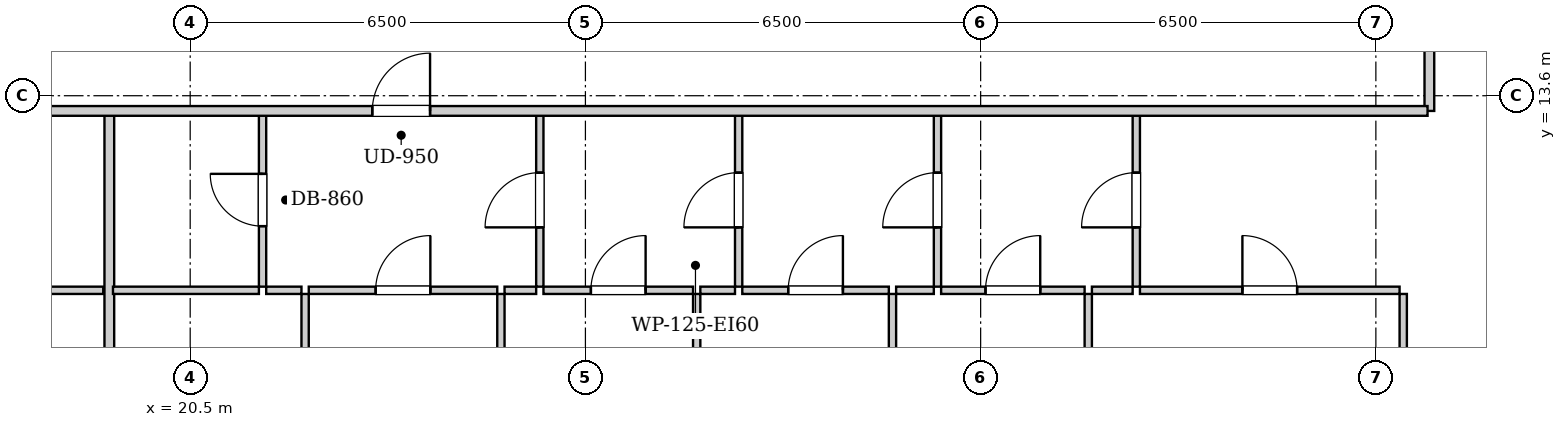
"""IFC4 building model, lengths in metres.
Left out: names, types, materials, properties, quantities, classifications, styles, units other than length and angle.
Written with IfcOpenShell. Run it as: python <this file> out.ifc"""

import sys

from ifc_helpers import new_model, si_unit, direction, frame, frame_2d, origin, place, context, subcontext, project, spatial, rectangle, extrude, element, fill, save


model = new_model("IFC4")
c1 = context("Model", 3, precision=1e-05, world=origin(), true_north=direction((0.0, 1.0)))
c2 = subcontext(c1, "Body", "Model", "MODEL_VIEW")
j1 = project(units=[si_unit("LENGTHUNIT", "METRE"), si_unit("PLANEANGLEUNIT", "RADIAN")], contexts=[c1])
p1 = place(None, origin())
s1 = spatial("IfcSite", under=j1, at=p1, CompositionType="ELEMENT")
p2 = place(p1, origin())
s2 = spatial("IfcBuilding", under=s1, at=p2, CompositionType="ELEMENT")
p3 = place(p2, frame((0.0, 0.0, 84.7)))
s3 = spatial("IfcBuildingStorey", under=s2, at=p3, CompositionType="ELEMENT", Elevation=84.7)
p4 = place(p3, frame((40.88, 13.35, 0.0), z_axis=(0.0, 0.0, 1.0), x_axis=(0.0, 1.0, 0.0)))
e1 = element("IfcWall", 1, at=p4, inside=s3, PredefinedType="PARTITIONING", context=c2, shape_type="SweptSolid", body=[
    extrude(rectangle(XDim=1.74, YDim=0.16, at=frame_2d((0.87, 0.0))), origin(), (0.0, 0.0, 1.0), 2.94),
])
p5 = place(p3, frame((16.17, 10.4, 0.0), z_axis=(0.0, 0.0, 1.0), x_axis=(1.0, 0.0, 0.0)))
e2 = element("IfcWall", 2, at=p5, inside=s3, PredefinedType="PARTITIONING", context=c2, shape_type="SweptSolid", body=[
    extrude(rectangle(XDim=2.9, YDim=0.12, at=frame_2d((1.45, 0.0))), origin(), (0.0, 0.0, 1.0), 2.94),
])
p6 = place(p5, frame((1.0, 0.0, 0.0)))
e3 = element("IfcOpeningElement", 3, at=p6, cuts=e2, PredefinedType="OPENING", context=c2, shape_type="SweptSolid", body=[
    extrude(rectangle(XDim=0.9, YDim=2.05, at=frame_2d((0.45, 1.025))), frame((0.0, 0.07, 0.0), z_axis=(0.0, -1.0, 0.0), x_axis=(1.0, 0.0, 0.0)), (0.0, 0.0, 1.0), 0.14),
])
p7 = place(p3, frame((19.17, 0.28, 0.0), z_axis=(0.0, 0.0, 1.0), x_axis=(0.0, 1.0, 0.0)))
e4 = element("IfcWall", 4, at=p7, inside=s3, PredefinedType="PARTITIONING", context=c2, shape_type="SweptSolid", body=[
    extrude(rectangle(XDim=13.03, YDim=0.16, at=frame_2d((6.515, 0.0))), origin(), (0.0, 0.0, 1.0), 2.94),
])
p8 = place(p3, frame((21.69, 10.46, 0.0), z_axis=(0.0, 0.0, 1.0), x_axis=(0.0, 1.0, 0.0)))
e5 = element("IfcWall", 5, at=p8, inside=s3, PredefinedType="PARTITIONING", context=c2, shape_type="SweptSolid", body=[
    extrude(rectangle(XDim=2.85, YDim=0.12, at=frame_2d((1.425, 0.0))), origin(), (0.0, 0.0, 1.0), 2.94),
])
p9 = place(p8, frame((0.995, 0.0, 0.0)))
e6 = element("IfcOpeningElement", 6, at=p9, cuts=e5, PredefinedType="OPENING", context=c2, shape_type="SweptSolid", body=[
    extrude(rectangle(XDim=0.86, YDim=2.05, at=frame_2d((0.43, 1.025))), frame((0.0, 0.07, 0.0), z_axis=(0.0, -1.0, 0.0), x_axis=(1.0, 0.0, 0.0)), (0.0, 0.0, 1.0), 0.14),
])
p10 = place(p3, frame((19.23, 10.4, 0.0), z_axis=(0.0, 0.0, 1.0), x_axis=(1.0, 0.0, 0.0)))
e7 = element("IfcWall", 7, at=p10, inside=s3, PredefinedType="PARTITIONING", context=c2, shape_type="SweptSolid", body=[
    extrude(rectangle(XDim=2.4, YDim=0.12, at=frame_2d((1.2, 0.0))), origin(), (0.0, 0.0, 1.0), 2.94),
])
p11 = place(p3, frame((26.25, 10.46, 0.0), z_axis=(0.0, 0.0, 1.0), x_axis=(0.0, 1.0, 0.0)))
e8 = element("IfcWall", 8, at=p11, inside=s3, PredefinedType="PARTITIONING", context=c2, shape_type="SweptSolid", body=[
    extrude(rectangle(XDim=2.85, YDim=0.12, at=frame_2d((1.425, 0.0))), origin(), (0.0, 0.0, 1.0), 2.94),
])
p12 = place(p11, frame((0.975, 0.0, 0.0)))
e9 = element("IfcOpeningElement", 9, at=p12, cuts=e8, PredefinedType="OPENING", context=c2, shape_type="SweptSolid", body=[
    extrude(rectangle(XDim=0.9, YDim=2.05, at=frame_2d((0.45, 1.025))), frame((0.0, 0.07, 0.0), z_axis=(0.0, -1.0, 0.0), x_axis=(1.0, 0.0, 0.0)), (0.0, 0.0, 1.0), 0.14),
])
p13 = place(p3, frame((21.75, 10.4, 0.0), z_axis=(0.0, 0.0, 1.0), x_axis=(1.0, 0.0, 0.0)))
e10 = element("IfcWall", 10, at=p13, inside=s3, PredefinedType="PARTITIONING", context=c2, shape_type="SweptSolid", body=[
    extrude(rectangle(XDim=0.58, YDim=0.12, at=frame_2d((0.29, 0.0))), origin(), (0.0, 0.0, 1.0), 2.94),
])
p14 = place(p3, frame((22.45, 10.4, 0.0), z_axis=(0.0, 0.0, 1.0), x_axis=(1.0, 0.0, 0.0)))
e11 = element("IfcWall", 11, at=p14, inside=s3, PredefinedType="PARTITIONING", context=c2, shape_type="SweptSolid", body=[
    extrude(rectangle(XDim=3.1, YDim=0.12, at=frame_2d((1.55, 0.0))), origin(), (0.0, 0.0, 1.0), 2.94),
])
p15 = place(p14, frame((1.1, 0.0, 0.0)))
e12 = element("IfcOpeningElement", 12, at=p15, cuts=e11, PredefinedType="OPENING", context=c2, shape_type="SweptSolid", body=[
    extrude(rectangle(XDim=0.9, YDim=2.05, at=frame_2d((0.45, 1.025))), frame((0.0, 0.07, 0.0), z_axis=(0.0, -1.0, 0.0), x_axis=(1.0, 0.0, 0.0)), (0.0, 0.0, 1.0), 0.14),
])
p16 = place(p3, frame((25.67, 10.4, 0.0), z_axis=(0.0, 0.0, 1.0), x_axis=(1.0, 0.0, 0.0)))
e13 = element("IfcWall", 13, at=p16, inside=s3, PredefinedType="PARTITIONING", context=c2, shape_type="SweptSolid", body=[
    extrude(rectangle(XDim=0.52, YDim=0.12, at=frame_2d((0.26, 0.0))), origin(), (0.0, 0.0, 1.0), 2.94),
])
p17 = place(p3, frame((29.52, 10.46, 0.0), z_axis=(0.0, 0.0, 1.0), x_axis=(0.0, 1.0, 0.0)))
e14 = element("IfcWall", 14, at=p17, inside=s3, PredefinedType="PARTITIONING", context=c2, shape_type="SweptSolid", body=[
    extrude(rectangle(XDim=2.85, YDim=0.12, at=frame_2d((1.425, 0.0))), origin(), (0.0, 0.0, 1.0), 2.94),
])
p18 = place(p17, frame((0.975, 0.0, 0.0)))
e15 = element("IfcOpeningElement", 15, at=p18, cuts=e14, PredefinedType="OPENING", context=c2, shape_type="SweptSolid", body=[
    extrude(rectangle(XDim=0.9, YDim=2.05, at=frame_2d((0.45, 1.025))), frame((0.0, 0.07, 0.0), z_axis=(0.0, -1.0, 0.0), x_axis=(1.0, 0.0, 0.0)), (0.0, 0.0, 1.0), 0.14),
])
p19 = place(p3, frame((26.31, 10.4, 0.0), z_axis=(0.0, 0.0, 1.0), x_axis=(1.0, 0.0, 0.0)))
e16 = element("IfcWall", 16, at=p19, inside=s3, PredefinedType="PARTITIONING", context=c2, shape_type="SweptSolid", body=[
    extrude(rectangle(XDim=2.46, YDim=0.12, at=frame_2d((1.23, 0.0))), origin(), (0.0, 0.0, 1.0), 2.94),
])
p20 = place(p19, frame((0.78, 0.0, 0.0)))
e17 = element("IfcOpeningElement", 17, at=p20, cuts=e16, PredefinedType="OPENING", context=c2, shape_type="SweptSolid", body=[
    extrude(rectangle(XDim=0.9, YDim=2.05, at=frame_2d((0.45, 1.025))), frame((0.0, 0.07, 0.0), z_axis=(0.0, -1.0, 0.0), x_axis=(1.0, 0.0, 0.0)), (0.0, 0.0, 1.0), 0.14),
])
p21 = place(p3, frame((28.89, 10.4, 0.0), z_axis=(0.0, 0.0, 1.0), x_axis=(1.0, 0.0, 0.0)))
e18 = element("IfcWall", 18, at=p21, inside=s3, PredefinedType="PARTITIONING", context=c2, shape_type="SweptSolid", body=[
    extrude(rectangle(XDim=0.57, YDim=0.12, at=frame_2d((0.285, 0.0))), origin(), (0.0, 0.0, 1.0), 2.94),
])
p22 = place(p3, frame((32.79, 10.46, 0.0), z_axis=(0.0, 0.0, 1.0), x_axis=(0.0, 1.0, 0.0)))
e19 = element("IfcWall", 19, at=p22, inside=s3, PredefinedType="PARTITIONING", context=c2, shape_type="SweptSolid", body=[
    extrude(rectangle(XDim=2.85, YDim=0.12, at=frame_2d((1.425, 0.0))), origin(), (0.0, 0.0, 1.0), 2.94),
])
p23 = place(p22, frame((0.975, 0.0, 0.0)))
e20 = element("IfcOpeningElement", 20, at=p23, cuts=e19, PredefinedType="OPENING", context=c2, shape_type="SweptSolid", body=[
    extrude(rectangle(XDim=0.9, YDim=2.05, at=frame_2d((0.45, 1.025))), frame((0.0, 0.07, 0.0), z_axis=(0.0, -1.0, 0.0), x_axis=(1.0, 0.0, 0.0)), (0.0, 0.0, 1.0), 0.14),
])
p24 = place(p3, frame((29.58, 10.4, 0.0), z_axis=(0.0, 0.0, 1.0), x_axis=(1.0, 0.0, 0.0)))
e21 = element("IfcWall", 21, at=p24, inside=s3, PredefinedType="PARTITIONING", context=c2, shape_type="SweptSolid", body=[
    extrude(rectangle(XDim=2.41, YDim=0.12, at=frame_2d((1.205, 0.0))), origin(), (0.0, 0.0, 1.0), 2.94),
])
p25 = place(p24, frame((0.755, 0.0, 0.0)))
e22 = element("IfcOpeningElement", 22, at=p25, cuts=e21, PredefinedType="OPENING", context=c2, shape_type="SweptSolid", body=[
    extrude(rectangle(XDim=0.9, YDim=2.05, at=frame_2d((0.45, 1.025))), frame((0.0, 0.07, 0.0), z_axis=(0.0, -1.0, 0.0), x_axis=(1.0, 0.0, 0.0)), (0.0, 0.0, 1.0), 0.14),
])
p26 = place(p3, frame((32.11, 10.4, 0.0), z_axis=(0.0, 0.0, 1.0), x_axis=(1.0, 0.0, 0.0)))
e23 = element("IfcWall", 23, at=p26, inside=s3, PredefinedType="PARTITIONING", context=c2, shape_type="SweptSolid", body=[
    extrude(rectangle(XDim=0.62, YDim=0.12, at=frame_2d((0.31, 0.0))), origin(), (0.0, 0.0, 1.0), 2.94),
])
p27 = place(p3, frame((36.06, 10.46, 0.0), z_axis=(0.0, 0.0, 1.0), x_axis=(0.0, 1.0, 0.0)))
e24 = element("IfcWall", 24, at=p27, inside=s3, PredefinedType="PARTITIONING", context=c2, shape_type="SweptSolid", body=[
    extrude(rectangle(XDim=2.85, YDim=0.12, at=frame_2d((1.425, 0.0))), origin(), (0.0, 0.0, 1.0), 2.94),
])
p28 = place(p27, frame((0.975, 0.0, 0.0)))
e25 = element("IfcOpeningElement", 25, at=p28, cuts=e24, PredefinedType="OPENING", context=c2, shape_type="SweptSolid", body=[
    extrude(rectangle(XDim=0.9, YDim=2.05, at=frame_2d((0.45, 1.025))), frame((0.0, 0.07, 0.0), z_axis=(0.0, -1.0, 0.0), x_axis=(1.0, 0.0, 0.0)), (0.0, 0.0, 1.0), 0.14),
])
p29 = place(p3, frame((32.85, 10.4, 0.0), z_axis=(0.0, 0.0, 1.0), x_axis=(1.0, 0.0, 0.0)))
e26 = element("IfcWall", 26, at=p29, inside=s3, PredefinedType="PARTITIONING", context=c2, shape_type="SweptSolid", body=[
    extrude(rectangle(XDim=2.36, YDim=0.12, at=frame_2d((1.18, 0.0))), origin(), (0.0, 0.0, 1.0), 2.94),
])
p30 = place(p29, frame((0.73, 0.0, 0.0)))
e27 = element("IfcOpeningElement", 27, at=p30, cuts=e26, PredefinedType="OPENING", context=c2, shape_type="SweptSolid", body=[
    extrude(rectangle(XDim=0.9, YDim=2.05, at=frame_2d((0.45, 1.025))), frame((0.0, 0.07, 0.0), z_axis=(0.0, -1.0, 0.0), x_axis=(1.0, 0.0, 0.0)), (0.0, 0.0, 1.0), 0.14),
])
p31 = place(p3, frame((35.33, 10.4, 0.0), z_axis=(0.0, 0.0, 1.0), x_axis=(1.0, 0.0, 0.0)))
e28 = element("IfcWall", 28, at=p31, inside=s3, PredefinedType="PARTITIONING", context=c2, shape_type="SweptSolid", body=[
    extrude(rectangle(XDim=0.67, YDim=0.12, at=frame_2d((0.335, 0.0))), origin(), (0.0, 0.0, 1.0), 2.94),
])
p32 = place(p3, frame((36.12, 10.4, 0.0), z_axis=(0.0, 0.0, 1.0), x_axis=(1.0, 0.0, 0.0)))
e29 = element("IfcWall", 29, at=p32, inside=s3, PredefinedType="PARTITIONING", context=c2, shape_type="SweptSolid", body=[
    extrude(rectangle(XDim=4.27, YDim=0.12, at=frame_2d((2.135, 0.0))), origin(), (0.0, 0.0, 1.0), 2.94),
])
p33 = place(p32, frame((1.685, 0.0, 0.0)))
e30 = element("IfcOpeningElement", 30, at=p33, cuts=e29, PredefinedType="OPENING", context=c2, shape_type="SweptSolid", body=[
    extrude(rectangle(XDim=0.9, YDim=2.05, at=frame_2d((0.45, 1.025))), frame((0.0, 0.07, 0.0), z_axis=(0.0, -1.0, 0.0), x_axis=(1.0, 0.0, 0.0)), (0.0, 0.0, 1.0), 0.14),
])
p34 = place(p3, frame((22.39, 0.28, 0.0), z_axis=(0.0, 0.0, 1.0), x_axis=(0.0, 1.0, 0.0)))
e31 = element("IfcWall", 31, at=p34, inside=s3, PredefinedType="PARTITIONING", context=c2, shape_type="SweptSolid", body=[
    extrude(rectangle(XDim=10.06, YDim=0.12, at=frame_2d((5.03, 0.0))), origin(), (0.0, 0.0, 1.0), 2.94),
])
p35 = place(p34, frame((4.565, 0.0, 0.0)))
e32 = element("IfcOpeningElement", 32, at=p35, cuts=e31, PredefinedType="OPENING", context=c2, shape_type="SweptSolid", body=[
    extrude(rectangle(XDim=0.9, YDim=2.05, at=frame_2d((0.45, 1.025))), frame((0.0, 0.07, 0.0), z_axis=(0.0, -1.0, 0.0), x_axis=(1.0, 0.0, 0.0)), (0.0, 0.0, 1.0), 0.14),
])
p36 = place(p3, frame((25.61, 0.28, 0.0), z_axis=(0.0, 0.0, 1.0), x_axis=(0.0, 1.0, 0.0)))
e33 = element("IfcWall", 33, at=p36, inside=s3, PredefinedType="PARTITIONING", context=c2, shape_type="SweptSolid", body=[
    extrude(rectangle(XDim=10.06, YDim=0.12, at=frame_2d((5.03, 0.0))), origin(), (0.0, 0.0, 1.0), 2.94),
])
p37 = place(p36, frame((4.565, 0.0, 0.0)))
e34 = element("IfcOpeningElement", 34, at=p37, cuts=e33, PredefinedType="OPENING", context=c2, shape_type="SweptSolid", body=[
    extrude(rectangle(XDim=0.9, YDim=2.05, at=frame_2d((0.45, 1.025))), frame((0.0, 0.07, 0.0), z_axis=(0.0, -1.0, 0.0), x_axis=(1.0, 0.0, 0.0)), (0.0, 0.0, 1.0), 0.14),
])
p38 = place(p3, frame((28.83, 0.28, 0.0), z_axis=(0.0, 0.0, 1.0), x_axis=(0.0, 1.0, 0.0)))
e35 = element("IfcWall", 35, at=p38, inside=s3, PredefinedType="PARTITIONING", context=c2, shape_type="SweptSolid", body=[
    extrude(rectangle(XDim=10.06, YDim=0.12, at=frame_2d((5.03, 0.0))), origin(), (0.0, 0.0, 1.0), 2.94),
])
p39 = place(p38, frame((4.565, 0.0, 0.0)))
e36 = element("IfcOpeningElement", 36, at=p39, cuts=e35, PredefinedType="OPENING", context=c2, shape_type="SweptSolid", body=[
    extrude(rectangle(XDim=0.9, YDim=2.05, at=frame_2d((0.45, 1.025))), frame((0.0, 0.07, 0.0), z_axis=(0.0, -1.0, 0.0), x_axis=(1.0, 0.0, 0.0)), (0.0, 0.0, 1.0), 0.14),
])
p40 = place(p3, frame((32.05, 0.28, 0.0), z_axis=(0.0, 0.0, 1.0), x_axis=(0.0, 1.0, 0.0)))
e37 = element("IfcWall", 37, at=p40, inside=s3, PredefinedType="PARTITIONING", context=c2, shape_type="SweptSolid", body=[
    extrude(rectangle(XDim=10.06, YDim=0.12, at=frame_2d((5.03, 0.0))), origin(), (0.0, 0.0, 1.0), 2.94),
])
p41 = place(p40, frame((4.565, 0.0, 0.0)))
e38 = element("IfcOpeningElement", 38, at=p41, cuts=e37, PredefinedType="OPENING", context=c2, shape_type="SweptSolid", body=[
    extrude(rectangle(XDim=0.9, YDim=2.05, at=frame_2d((0.45, 1.025))), frame((0.0, 0.07, 0.0), z_axis=(0.0, -1.0, 0.0), x_axis=(1.0, 0.0, 0.0)), (0.0, 0.0, 1.0), 0.14),
])
p42 = place(p3, frame((35.27, 0.28, 0.0), z_axis=(0.0, 0.0, 1.0), x_axis=(0.0, 1.0, 0.0)))
e39 = element("IfcWall", 39, at=p42, inside=s3, PredefinedType="PARTITIONING", context=c2, shape_type="SweptSolid", body=[
    extrude(rectangle(XDim=10.06, YDim=0.12, at=frame_2d((5.03, 0.0))), origin(), (0.0, 0.0, 1.0), 2.94),
])
p43 = place(p42, frame((4.565, 0.0, 0.0)))
e40 = element("IfcOpeningElement", 40, at=p43, cuts=e39, PredefinedType="OPENING", context=c2, shape_type="SweptSolid", body=[
    extrude(rectangle(XDim=0.9, YDim=2.05, at=frame_2d((0.45, 1.025))), frame((0.0, 0.07, 0.0), z_axis=(0.0, -1.0, 0.0), x_axis=(1.0, 0.0, 0.0)), (0.0, 0.0, 1.0), 0.14),
])
p44 = place(p3, frame((40.45, 0.28, 0.0), z_axis=(0.0, 0.0, 1.0), x_axis=(0.0, 1.0, 0.0)))
e41 = element("IfcWall", 41, at=p44, inside=s3, PredefinedType="PARTITIONING", context=c2, shape_type="SweptSolid", body=[
    extrude(rectangle(XDim=10.06, YDim=0.12, at=frame_2d((5.03, 0.0))), origin(), (0.0, 0.0, 1.0), 2.94),
])
p45 = place(p44, frame((4.565, 0.0, 0.0)))
e42 = element("IfcOpeningElement", 42, at=p45, cuts=e41, PredefinedType="OPENING", context=c2, shape_type="SweptSolid", body=[
    extrude(rectangle(XDim=0.9, YDim=2.05, at=frame_2d((0.45, 1.025))), frame((0.0, 0.07, 0.0), z_axis=(0.0, -1.0, 0.0), x_axis=(1.0, 0.0, 0.0)), (0.0, 0.0, 1.0), 0.14),
])
p46 = place(p3, frame((10.05, 13.35, 0.0), z_axis=(0.0, 0.0, 1.0), x_axis=(1.0, 0.0, 0.0)))
e43 = element("IfcWall", 43, at=p46, inside=s3, PredefinedType="PARTITIONING", context=c2, shape_type="SweptSolid", body=[
    extrude(rectangle(XDim=30.8, YDim=0.16, at=frame_2d((15.4, 0.0))), origin(), (0.0, 0.0, 1.0), 2.94),
])
p47 = place(p46, frame((3.8, 0.0, 0.0)))
e44 = element("IfcOpeningElement", 44, at=p47, cuts=e43, PredefinedType="OPENING", context=c2, shape_type="SweptSolid", body=[
    extrude(rectangle(XDim=0.95, YDim=2.1, at=frame_2d((0.475, 1.05))), frame((0.0, 0.09, 0.0), z_axis=(0.0, -1.0, 0.0), x_axis=(1.0, 0.0, 0.0)), (0.0, 0.0, 1.0), 0.18),
])
p48 = place(p46, frame((13.445, 0.0, 0.0)))
e45 = element("IfcOpeningElement", 45, at=p48, cuts=e43, PredefinedType="OPENING", context=c2, shape_type="SweptSolid", body=[
    extrude(rectangle(XDim=0.95, YDim=2.1, at=frame_2d((0.475, 1.05))), frame((0.0, 0.09, 0.0), z_axis=(0.0, -1.0, 0.0), x_axis=(1.0, 0.0, 0.0)), (0.0, 0.0, 1.0), 0.18),
])
p49 = place(p9, origin())
e46 = element("IfcDoor", 46, at=p49, inside=s3, OperationType="SINGLE_SWING_RIGHT", PredefinedType="DOOR", context=c2, shape_type="SweptSolid", body=[
    extrude(rectangle(XDim=0.86, YDim=2.05, at=frame_2d((0.43, 1.025))), frame((0.0, 0.025, 0.0), z_axis=(0.0, -1.0, 0.0), x_axis=(1.0, 0.0, 0.0)), (0.0, 0.0, 1.0), 0.05),
])
fill(e6, e46)
p50 = place(p12, origin())
e47 = element("IfcDoor", 47, at=p50, inside=s3, OperationType="SINGLE_SWING_LEFT", PredefinedType="DOOR", context=c2, shape_type="SweptSolid", body=[
    extrude(rectangle(XDim=0.9, YDim=2.05, at=frame_2d((0.45, 1.025))), frame((0.0, 0.025, 0.0), z_axis=(0.0, -1.0, 0.0), x_axis=(1.0, 0.0, 0.0)), (0.0, 0.0, 1.0), 0.05),
])
fill(e9, e47)
p51 = place(p15, origin())
e48 = element("IfcDoor", 48, at=p51, inside=s3, OperationType="SINGLE_SWING_RIGHT", PredefinedType="DOOR", context=c2, shape_type="SweptSolid", body=[
    extrude(rectangle(XDim=0.9, YDim=2.05, at=frame_2d((0.45, 1.025))), frame((0.0, 0.025, 0.0), z_axis=(0.0, -1.0, 0.0), x_axis=(1.0, 0.0, 0.0)), (0.0, 0.0, 1.0), 0.05),
])
fill(e12, e48)
p52 = place(p18, origin())
e49 = element("IfcDoor", 49, at=p52, inside=s3, OperationType="SINGLE_SWING_LEFT", PredefinedType="DOOR", context=c2, shape_type="SweptSolid", body=[
    extrude(rectangle(XDim=0.9, YDim=2.05, at=frame_2d((0.45, 1.025))), frame((0.0, 0.025, 0.0), z_axis=(0.0, -1.0, 0.0), x_axis=(1.0, 0.0, 0.0)), (0.0, 0.0, 1.0), 0.05),
])
fill(e15, e49)
p53 = place(p20, origin())
e50 = element("IfcDoor", 50, at=p53, inside=s3, OperationType="SINGLE_SWING_RIGHT", PredefinedType="DOOR", context=c2, shape_type="SweptSolid", body=[
    extrude(rectangle(XDim=0.9, YDim=2.05, at=frame_2d((0.45, 1.025))), frame((0.0, 0.025, 0.0), z_axis=(0.0, -1.0, 0.0), x_axis=(1.0, 0.0, 0.0)), (0.0, 0.0, 1.0), 0.05),
])
fill(e17, e50)
p54 = place(p23, origin())
e51 = element("IfcDoor", 51, at=p54, inside=s3, OperationType="SINGLE_SWING_LEFT", PredefinedType="DOOR", context=c2, shape_type="SweptSolid", body=[
    extrude(rectangle(XDim=0.9, YDim=2.05, at=frame_2d((0.45, 1.025))), frame((0.0, 0.025, 0.0), z_axis=(0.0, -1.0, 0.0), x_axis=(1.0, 0.0, 0.0)), (0.0, 0.0, 1.0), 0.05),
])
fill(e20, e51)
p55 = place(p25, origin())
e52 = element("IfcDoor", 52, at=p55, inside=s3, OperationType="SINGLE_SWING_RIGHT", PredefinedType="DOOR", context=c2, shape_type="SweptSolid", body=[
    extrude(rectangle(XDim=0.9, YDim=2.05, at=frame_2d((0.45, 1.025))), frame((0.0, 0.025, 0.0), z_axis=(0.0, -1.0, 0.0), x_axis=(1.0, 0.0, 0.0)), (0.0, 0.0, 1.0), 0.05),
])
fill(e22, e52)
p56 = place(p28, origin())
e53 = element("IfcDoor", 53, at=p56, inside=s3, OperationType="SINGLE_SWING_LEFT", PredefinedType="DOOR", context=c2, shape_type="SweptSolid", body=[
    extrude(rectangle(XDim=0.9, YDim=2.05, at=frame_2d((0.45, 1.025))), frame((0.0, 0.025, 0.0), z_axis=(0.0, -1.0, 0.0), x_axis=(1.0, 0.0, 0.0)), (0.0, 0.0, 1.0), 0.05),
])
fill(e25, e53)
p57 = place(p30, origin())
e54 = element("IfcDoor", 54, at=p57, inside=s3, OperationType="SINGLE_SWING_RIGHT", PredefinedType="DOOR", context=c2, shape_type="SweptSolid", body=[
    extrude(rectangle(XDim=0.9, YDim=2.05, at=frame_2d((0.45, 1.025))), frame((0.0, 0.025, 0.0), z_axis=(0.0, -1.0, 0.0), x_axis=(1.0, 0.0, 0.0)), (0.0, 0.0, 1.0), 0.05),
])
fill(e27, e54)
p58 = place(p33, origin())
e55 = element("IfcDoor", 55, at=p58, inside=s3, OperationType="SINGLE_SWING_LEFT", PredefinedType="DOOR", context=c2, shape_type="SweptSolid", body=[
    extrude(rectangle(XDim=0.9, YDim=2.05, at=frame_2d((0.45, 1.025))), frame((0.0, 0.025, 0.0), z_axis=(0.0, -1.0, 0.0), x_axis=(1.0, 0.0, 0.0)), (0.0, 0.0, 1.0), 0.05),
])
fill(e30, e55)
p59 = place(p48, origin())
e56 = element("IfcDoor", 56, at=p59, inside=s3, OperationType="SINGLE_SWING_RIGHT", PredefinedType="DOOR", context=c2, shape_type="SweptSolid", body=[
    extrude(rectangle(XDim=0.95, YDim=2.1, at=frame_2d((0.475, 1.05))), frame((0.0, 0.025, 0.0), z_axis=(0.0, -1.0, 0.0), x_axis=(1.0, 0.0, 0.0)), (0.0, 0.0, 1.0), 0.05),
])
fill(e45, e56)
save(model, sys.argv[1])
